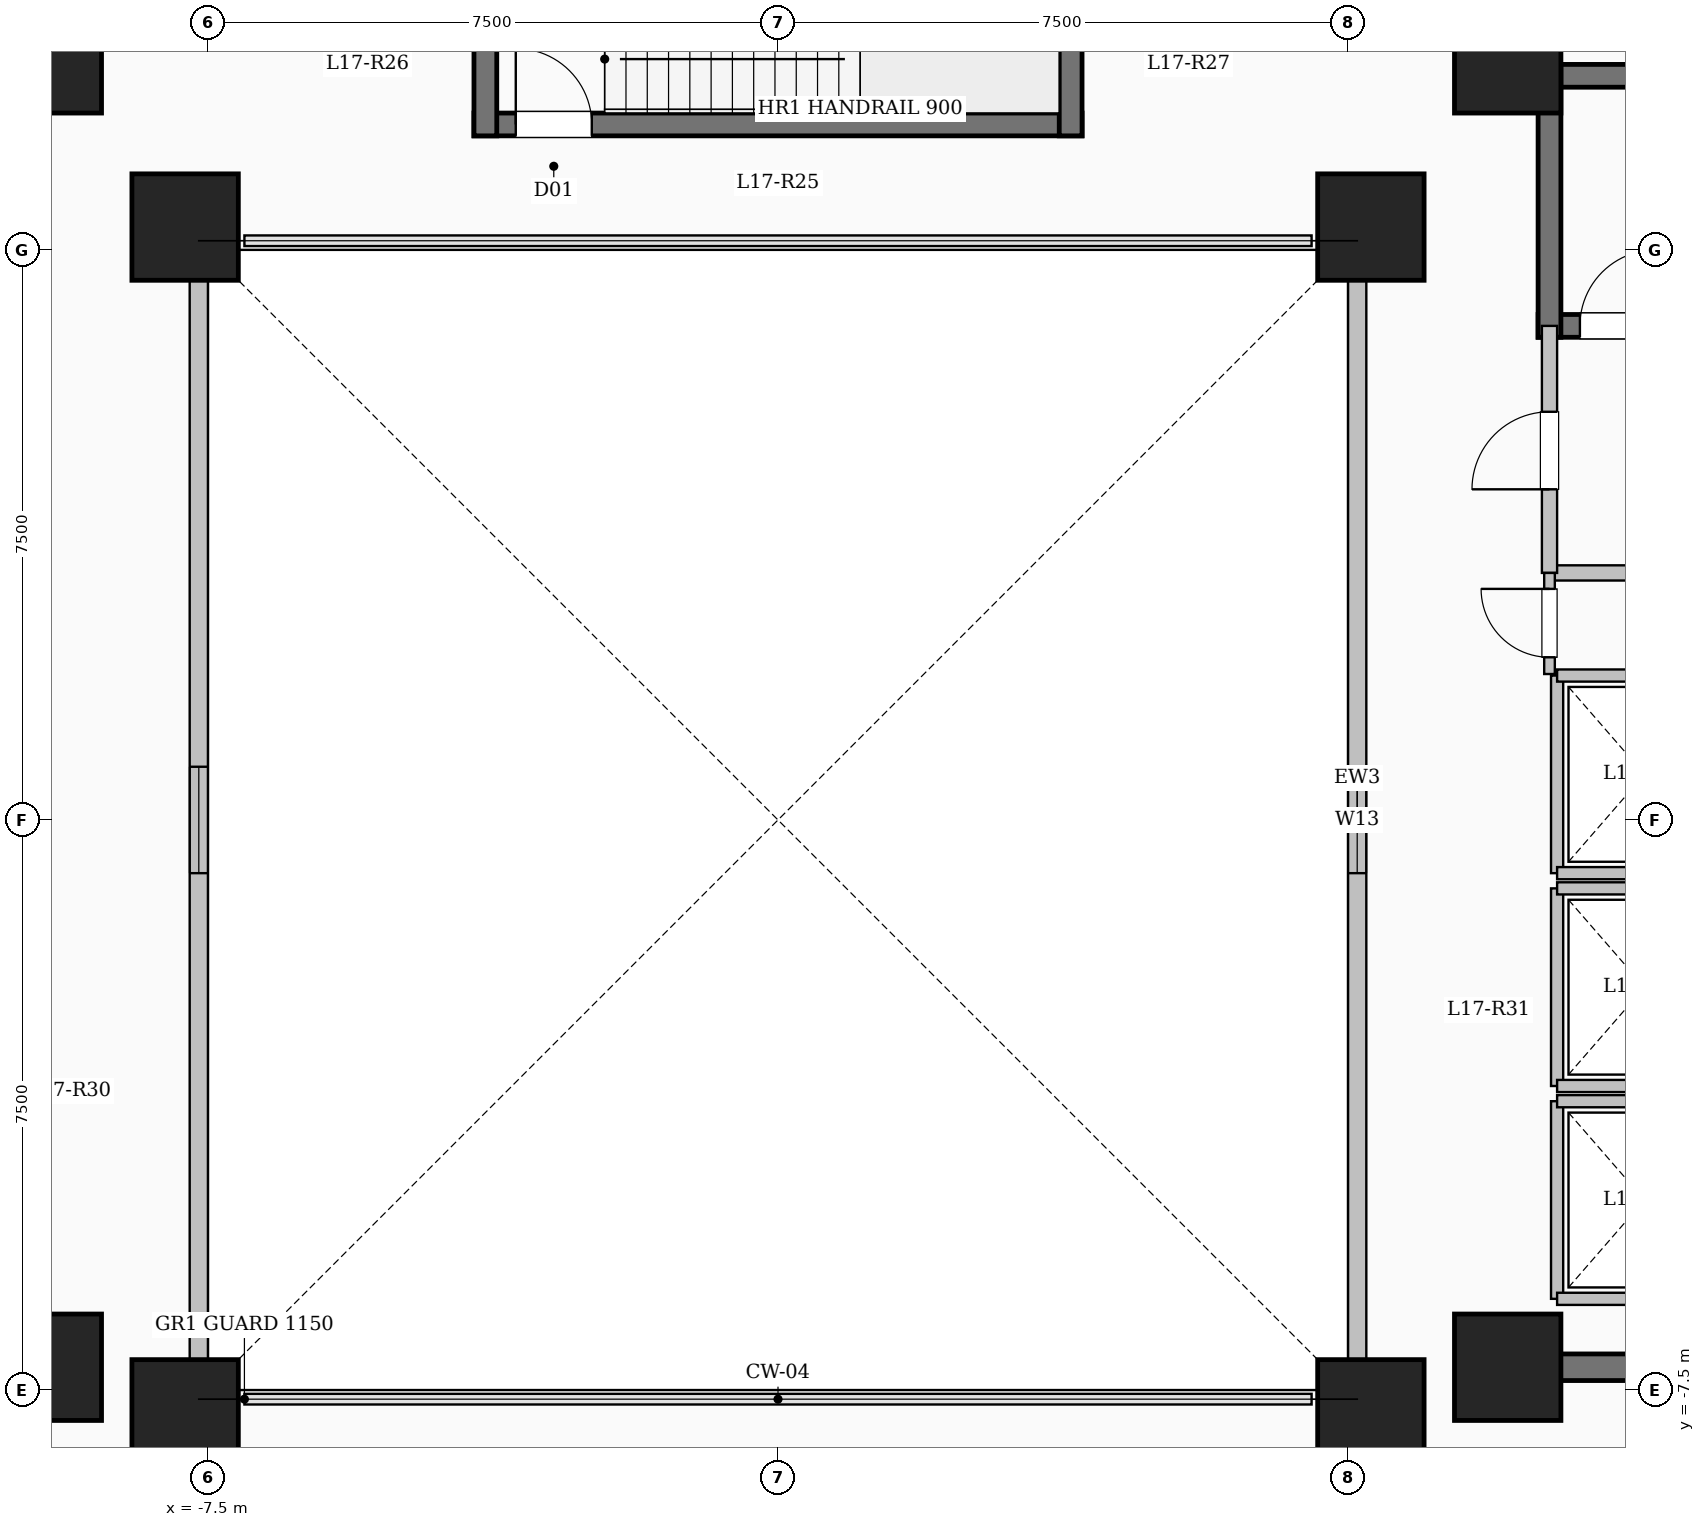
"""IFC4 building model, lengths in metres.
Left out: names, types, materials, properties, quantities, classifications, styles, units other than length and angle.
Written with IfcOpenShell. Run it as: python <this file> out.ifc"""

import sys

from ifc_helpers import new_model, si_unit, direction, frame, frame_2d, origin, origin_2d, place, context, subcontext, project, spatial, rectangle, extrude, element, fill, save


model = new_model("IFC4")
c1 = context("Model", 3, precision=1e-05, world=origin(), true_north=direction((0.0, 1.0)))
c2 = subcontext(c1, "Body", "Model", "MODEL_VIEW")
j1 = project(units=[si_unit("LENGTHUNIT", "METRE"), si_unit("PLANEANGLEUNIT", "RADIAN")], contexts=[c1])
p1 = place(None, origin())
s1 = spatial("IfcSite", under=j1, at=p1, CompositionType="ELEMENT")
p2 = place(p1, origin())
s2 = spatial("IfcBuilding", under=s1, at=p2, CompositionType="ELEMENT")
p3 = place(p2, frame((0.0, 0.0, 64.2)))
s3 = spatial("IfcBuildingStorey", under=s2, at=p3, CompositionType="ELEMENT", Elevation=64.2)
for number, where, z_axis, x_axis in (
    (1, (-7.8, -7.8, 0.0), (0.0, 0.0, 1.0), (1.0, 0.0, 0.0)),
    (2, (7.8, -7.8, 0.0), (0.0, 0.0, 1.0), (1.0, 0.0, 0.0)),
    (3, (-7.8, 7.8, 0.0), (0.0, 0.0, 1.0), (1.0, 0.0, 0.0)),
    (4, (7.8, 7.8, 0.0), (0.0, 0.0, 1.0), (1.0, 0.0, 0.0)),
    (5, (-9.6, -7.2, 0.0), (0.0, 0.0, 1.0), (1.0, 0.0, 0.0)),
    (6, (-9.6, 10.0, 0.0), (0.0, 0.0, 1.0), (1.0, 0.0, 0.0)),
    (7, (9.6, -7.2, 0.0), (0.0, 0.0, 1.0), (1.0, 0.0, 0.0)),
    (8, (9.6, 10.0, 0.0), (0.0, 0.0, 1.0), (1.0, 0.0, 0.0)),
):
    element("IfcColumn", number, at=place(p3, frame(where, z_axis=z_axis, x_axis=x_axis)), inside=s3, PredefinedType="COLUMN", context=c2, shape_type="SweptSolid", body=[
        extrude(rectangle(XDim=1.4, YDim=1.4, at=origin_2d()), origin(), (0.0, 0.0, 1.0), 4.5),
    ])
p4 = place(p3, frame((7.62, -7.62, 0.0), z_axis=(0.0, 0.0, 1.0), x_axis=(0.0, 1.0, 0.0)))
e9 = element("IfcWall", 9, at=p4, inside=s3, PredefinedType="SOLIDWALL", context=c2, shape_type="SweptSolid", body=[
    extrude(rectangle(XDim=15.24, YDim=0.24, at=frame_2d((7.62, 0.0))), origin(), (0.0, 0.0, 1.0), 4.2),
])
p5 = place(p4, frame((6.92, 0.0, 0.95)))
e10 = element("IfcOpeningElement", 10, at=p5, cuts=e9, PredefinedType="OPENING", context=c2, shape_type="SweptSolid", body=[
    extrude(rectangle(XDim=1.4, YDim=1.5, at=frame_2d((0.7, 0.75))), frame((0.0, 0.13, 0.0), z_axis=(0.0, -1.0, 0.0), x_axis=(1.0, 0.0, 0.0)), (0.0, 0.0, 1.0), 0.26),
])
p6 = place(p3, frame((-7.62, 7.62, 0.0), z_axis=(0.0, 0.0, 1.0), x_axis=(0.0, -1.0, 0.0)))
e11 = element("IfcWall", 11, at=p6, inside=s3, PredefinedType="SOLIDWALL", context=c2, shape_type="SweptSolid", body=[
    extrude(rectangle(XDim=15.24, YDim=0.24, at=frame_2d((7.62, 0.0))), origin(), (0.0, 0.0, 1.0), 4.2),
])
p7 = place(p6, frame((6.92, 0.0, 0.95)))
e12 = element("IfcOpeningElement", 12, at=p7, cuts=e11, PredefinedType="OPENING", context=c2, shape_type="SweptSolid", body=[
    extrude(rectangle(XDim=1.4, YDim=1.5, at=frame_2d((0.7, 0.75))), frame((0.0, 0.13, 0.0), z_axis=(0.0, -1.0, 0.0), x_axis=(1.0, 0.0, 0.0)), (0.0, 0.0, 1.0), 0.26),
])
p8 = place(p3, frame((10.0, 9.79, 0.0), z_axis=(0.0, 0.0, 1.0), x_axis=(1.0, 0.0, 0.0)))
e13 = element("IfcWall", 13, at=p8, inside=s3, PredefinedType="SHEAR", context=c2, shape_type="SweptSolid", body=[
    extrude(rectangle(XDim=8.0, YDim=0.3, at=frame_2d((4.0, 0.0))), origin(), (0.0, 0.0, 1.0), 4.5),
])
p9 = place(p3, frame((10.0, 6.5, 0.0), z_axis=(0.0, 0.0, 1.0), x_axis=(1.0, 0.0, 0.0)))
e14 = element("IfcWall", 14, at=p9, inside=s3, PredefinedType="SHEAR", context=c2, shape_type="SweptSolid", body=[
    extrude(rectangle(XDim=8.0, YDim=0.3, at=frame_2d((4.0, 0.0))), origin(), (0.0, 0.0, 1.0), 4.5),
])
p10 = place(p9, frame((0.55, 0.0, 0.0)))
e15 = element("IfcOpeningElement", 15, at=p10, cuts=e14, PredefinedType="OPENING", context=c2, shape_type="SweptSolid", body=[
    extrude(rectangle(XDim=1.0, YDim=2.15, at=frame_2d((0.5, 1.075))), frame((0.0, 0.16, 0.0), z_axis=(0.0, -1.0, 0.0), x_axis=(1.0, 0.0, 0.0)), (0.0, 0.0, 1.0), 0.32),
])
p11 = place(p3, frame((10.15, 6.35, 0.0), z_axis=(0.0, 0.0, 1.0), x_axis=(0.0, 1.0, 0.0)))
e16 = element("IfcWall", 16, at=p11, inside=s3, PredefinedType="SHEAR", context=c2, shape_type="SweptSolid", body=[
    extrude(rectangle(XDim=3.59, YDim=0.3, at=frame_2d((1.795, 0.0))), origin(), (0.0, 0.0, 1.0), 4.5),
])
p12 = place(p3, frame((-4.0, 9.15, 0.0), z_axis=(0.0, 0.0, 1.0), x_axis=(1.0, 0.0, 0.0)))
e17 = element("IfcWall", 17, at=p12, inside=s3, PredefinedType="SHEAR", context=c2, shape_type="SweptSolid", body=[
    extrude(rectangle(XDim=8.0, YDim=0.3, at=frame_2d((4.0, 0.0))), origin(), (0.0, 0.0, 1.0), 4.5),
])
p13 = place(p12, frame((0.55, 0.0, 0.0)))
e18 = element("IfcOpeningElement", 18, at=p13, cuts=e17, PredefinedType="OPENING", context=c2, shape_type="SweptSolid", body=[
    extrude(rectangle(XDim=1.0, YDim=2.15, at=frame_2d((0.5, 1.075))), frame((0.0, 0.16, 0.0), z_axis=(0.0, -1.0, 0.0), x_axis=(1.0, 0.0, 0.0)), (0.0, 0.0, 1.0), 0.32),
])
for number, where, z_axis, x_axis in (
    (19, (-3.85, 9.0, 0.0), (0.0, 0.0, 1.0), (0.0, 1.0, 0.0)),
    (20, (3.85, 9.0, 0.0), (0.0, 0.0, 1.0), (0.0, 1.0, 0.0)),
):
    element("IfcWall", number, at=place(p3, frame(where, z_axis=z_axis, x_axis=x_axis)), inside=s3, PredefinedType="SHEAR", context=c2, shape_type="SweptSolid", body=[
        extrude(rectangle(XDim=3.59, YDim=0.3, at=frame_2d((1.795, 0.0))), origin(), (0.0, 0.0, 1.0), 4.5),
    ])
p14 = place(p3, frame((10.15, 3.25, 0.0), z_axis=(0.0, 0.0, 1.0), x_axis=(1.0, 0.0, 0.0)))
e21 = element("IfcWall", 21, at=p14, inside=s3, PredefinedType="SOLIDWALL", context=c2, shape_type="SweptSolid", body=[
    extrude(rectangle(XDim=5.4, YDim=0.2, at=frame_2d((2.7, 0.0))), origin(), (0.0, 0.0, 1.0), 4.2),
])
p15 = place(p3, frame((10.15, 3.25, 0.0), z_axis=(0.0, 0.0, 1.0), x_axis=(0.0, 1.0, 0.0)))
e22 = element("IfcWall", 22, at=p15, inside=s3, PredefinedType="SOLIDWALL", context=c2, shape_type="SweptSolid", body=[
    extrude(rectangle(XDim=3.25, YDim=0.2, at=frame_2d((1.625, 0.0))), origin(), (0.0, 0.0, 1.0), 4.2),
])
p16 = place(p15, frame((1.1, 0.0, 0.0)))
e23 = element("IfcOpeningElement", 23, at=p16, cuts=e22, PredefinedType="OPENING", context=c2, shape_type="SweptSolid", body=[
    extrude(rectangle(XDim=1.02, YDim=2.15, at=frame_2d((0.51, 1.075))), frame((0.0, 0.11, 0.0), z_axis=(0.0, -1.0, 0.0), x_axis=(1.0, 0.0, 0.0)), (0.0, 0.0, 1.0), 0.22),
])
p17 = place(p3, frame((10.25, -6.3, 0.0), z_axis=(0.0, 0.0, 1.0), x_axis=(0.0, 1.0, 0.0)))
e24 = element("IfcWall", 24, at=p17, inside=s3, PredefinedType="SOLIDWALL", context=c2, shape_type="SweptSolid", body=[
    extrude(rectangle(XDim=2.6, YDim=0.16, at=frame_2d((1.3, 0.0))), origin(), (0.0, 0.0, 1.0), 4.2),
])
for number, where, z_axis, x_axis in (
    (25, (10.25, -6.3, 0.0), (0.0, 0.0, 1.0), (1.0, 0.0, 0.0)),
    (26, (10.25, -3.7, 0.0), (0.0, 0.0, 1.0), (1.0, 0.0, 0.0)),
):
    element("IfcWall", number, at=place(p3, frame(where, z_axis=z_axis, x_axis=x_axis)), inside=s3, PredefinedType="SOLIDWALL", context=c2, shape_type="SweptSolid", body=[
        extrude(rectangle(XDim=2.3, YDim=0.16, at=frame_2d((1.15, 0.0))), origin(), (0.0, 0.0, 1.0), 4.2),
    ])
p18 = place(p3, frame((10.25, -3.5, 0.0), z_axis=(0.0, 0.0, 1.0), x_axis=(0.0, 1.0, 0.0)))
e27 = element("IfcWall", 27, at=p18, inside=s3, PredefinedType="SOLIDWALL", context=c2, shape_type="SweptSolid", body=[
    extrude(rectangle(XDim=2.6, YDim=0.16, at=frame_2d((1.3, 0.0))), origin(), (0.0, 0.0, 1.0), 4.2),
])
for number, where, z_axis, x_axis in (
    (28, (10.25, -3.5, 0.0), (0.0, 0.0, 1.0), (1.0, 0.0, 0.0)),
    (29, (10.25, -0.9, 0.0), (0.0, 0.0, 1.0), (1.0, 0.0, 0.0)),
):
    element("IfcWall", number, at=place(p3, frame(where, z_axis=z_axis, x_axis=x_axis)), inside=s3, PredefinedType="SOLIDWALL", context=c2, shape_type="SweptSolid", body=[
        extrude(rectangle(XDim=2.3, YDim=0.16, at=frame_2d((1.15, 0.0))), origin(), (0.0, 0.0, 1.0), 4.2),
    ])
p19 = place(p3, frame((10.25, -0.7, 0.0), z_axis=(0.0, 0.0, 1.0), x_axis=(0.0, 1.0, 0.0)))
e30 = element("IfcWall", 30, at=p19, inside=s3, PredefinedType="SOLIDWALL", context=c2, shape_type="SweptSolid", body=[
    extrude(rectangle(XDim=2.6, YDim=0.16, at=frame_2d((1.3, 0.0))), origin(), (0.0, 0.0, 1.0), 4.2),
])
for number, where, z_axis, x_axis in (
    (31, (10.25, -0.7, 0.0), (0.0, 0.0, 1.0), (1.0, 0.0, 0.0)),
    (32, (10.25, 1.9, 0.0), (0.0, 0.0, 1.0), (1.0, 0.0, 0.0)),
):
    element("IfcWall", number, at=place(p3, frame(where, z_axis=z_axis, x_axis=x_axis)), inside=s3, PredefinedType="SOLIDWALL", context=c2, shape_type="SweptSolid", body=[
        extrude(rectangle(XDim=2.3, YDim=0.16, at=frame_2d((1.15, 0.0))), origin(), (0.0, 0.0, 1.0), 4.2),
    ])
p20 = place(p3, frame((10.075, -7.2, 0.0), z_axis=(0.0, 0.0, 1.0), x_axis=(1.0, 0.0, 0.0)))
e33 = element("IfcWall", 33, at=p20, inside=s3, PredefinedType="SHEAR", context=c2, shape_type="SweptSolid", body=[
    extrude(rectangle(XDim=8.55, YDim=0.35, at=frame_2d((4.275, 0.0))), origin(), (0.0, 0.0, 1.0), 4.5),
])
p21 = place(p3, frame((10.15, 1.92, 0.0), z_axis=(0.0, 0.0, 1.0), x_axis=(0.0, 1.0, 0.0)))
e34 = element("IfcWall", 34, at=p21, inside=s3, PredefinedType="PARTITIONING", context=c2, shape_type="SweptSolid", body=[
    extrude(rectangle(XDim=1.33, YDim=0.14, at=frame_2d((0.665, 0.0))), origin(), (0.0, 0.0, 1.0), 4.2),
])
p22 = place(p21, frame((0.22, 0.0, 0.0)))
e35 = element("IfcOpeningElement", 35, at=p22, cuts=e34, PredefinedType="OPENING", context=c2, shape_type="SweptSolid", body=[
    extrude(rectangle(XDim=0.9, YDim=2.08, at=frame_2d((0.45, 1.04))), frame((0.0, 0.08, 0.0), z_axis=(0.0, -1.0, 0.0), x_axis=(1.0, 0.0, 0.0)), (0.0, 0.0, 1.0), 0.16),
])
p23 = place(p5, origin())
e36 = element("IfcWindow", 36, at=p23, inside=s3, PartitioningType="SINGLE_PANEL", PredefinedType="WINDOW", context=c2, shape_type="SweptSolid", body=[
    extrude(rectangle(XDim=1.4, YDim=1.5, at=frame_2d((0.7, 0.75))), frame((0.0, 0.03, 0.0), z_axis=(0.0, -1.0, 0.0), x_axis=(1.0, 0.0, 0.0)), (0.0, 0.0, 1.0), 0.06),
])
fill(e10, e36)
p24 = place(p7, origin())
e37 = element("IfcWindow", 37, at=p24, inside=s3, PartitioningType="SINGLE_PANEL", PredefinedType="WINDOW", context=c2, shape_type="SweptSolid", body=[
    extrude(rectangle(XDim=1.4, YDim=1.5, at=frame_2d((0.7, 0.75))), frame((0.0, 0.03, 0.0), z_axis=(0.0, -1.0, 0.0), x_axis=(1.0, 0.0, 0.0)), (0.0, 0.0, 1.0), 0.06),
])
fill(e12, e37)
p25 = place(p10, origin())
e38 = element("IfcDoor", 38, at=p25, inside=s3, OperationType="SINGLE_SWING_RIGHT", PredefinedType="DOOR", context=c2, shape_type="SweptSolid", body=[
    extrude(rectangle(XDim=1.0, YDim=2.15, at=frame_2d((0.5, 1.075))), frame((0.0, 0.025, 0.0), z_axis=(0.0, -1.0, 0.0), x_axis=(1.0, 0.0, 0.0)), (0.0, 0.0, 1.0), 0.05),
])
fill(e15, e38)
p26 = place(p13, origin())
e39 = element("IfcDoor", 39, at=p26, inside=s3, OperationType="SINGLE_SWING_LEFT", PredefinedType="DOOR", context=c2, shape_type="SweptSolid", body=[
    extrude(rectangle(XDim=1.0, YDim=2.15, at=frame_2d((0.5, 1.075))), frame((0.0, 0.025, 0.0), z_axis=(0.0, -1.0, 0.0), x_axis=(1.0, 0.0, 0.0)), (0.0, 0.0, 1.0), 0.05),
])
fill(e18, e39)
p27 = place(p16, origin())
e40 = element("IfcDoor", 40, at=p27, inside=s3, OperationType="SINGLE_SWING_LEFT", PredefinedType="DOOR", context=c2, shape_type="SweptSolid", body=[
    extrude(rectangle(XDim=1.02, YDim=2.15, at=frame_2d((0.51, 1.075))), frame((0.0, 0.025, 0.0), z_axis=(0.0, -1.0, 0.0), x_axis=(1.0, 0.0, 0.0)), (0.0, 0.0, 1.0), 0.05),
])
fill(e23, e40)
p28 = place(p22, origin())
e41 = element("IfcDoor", 41, at=p28, inside=s3, OperationType="SINGLE_SWING_RIGHT", PredefinedType="DOOR", context=c2, shape_type="SweptSolid", body=[
    extrude(rectangle(XDim=0.9, YDim=2.08, at=frame_2d((0.45, 1.04))), frame((0.0, 0.025, 0.0), z_axis=(0.0, -1.0, 0.0), x_axis=(1.0, 0.0, 0.0)), (0.0, 0.0, 1.0), 0.05),
])
fill(e35, e41)
save(model, sys.argv[1])
